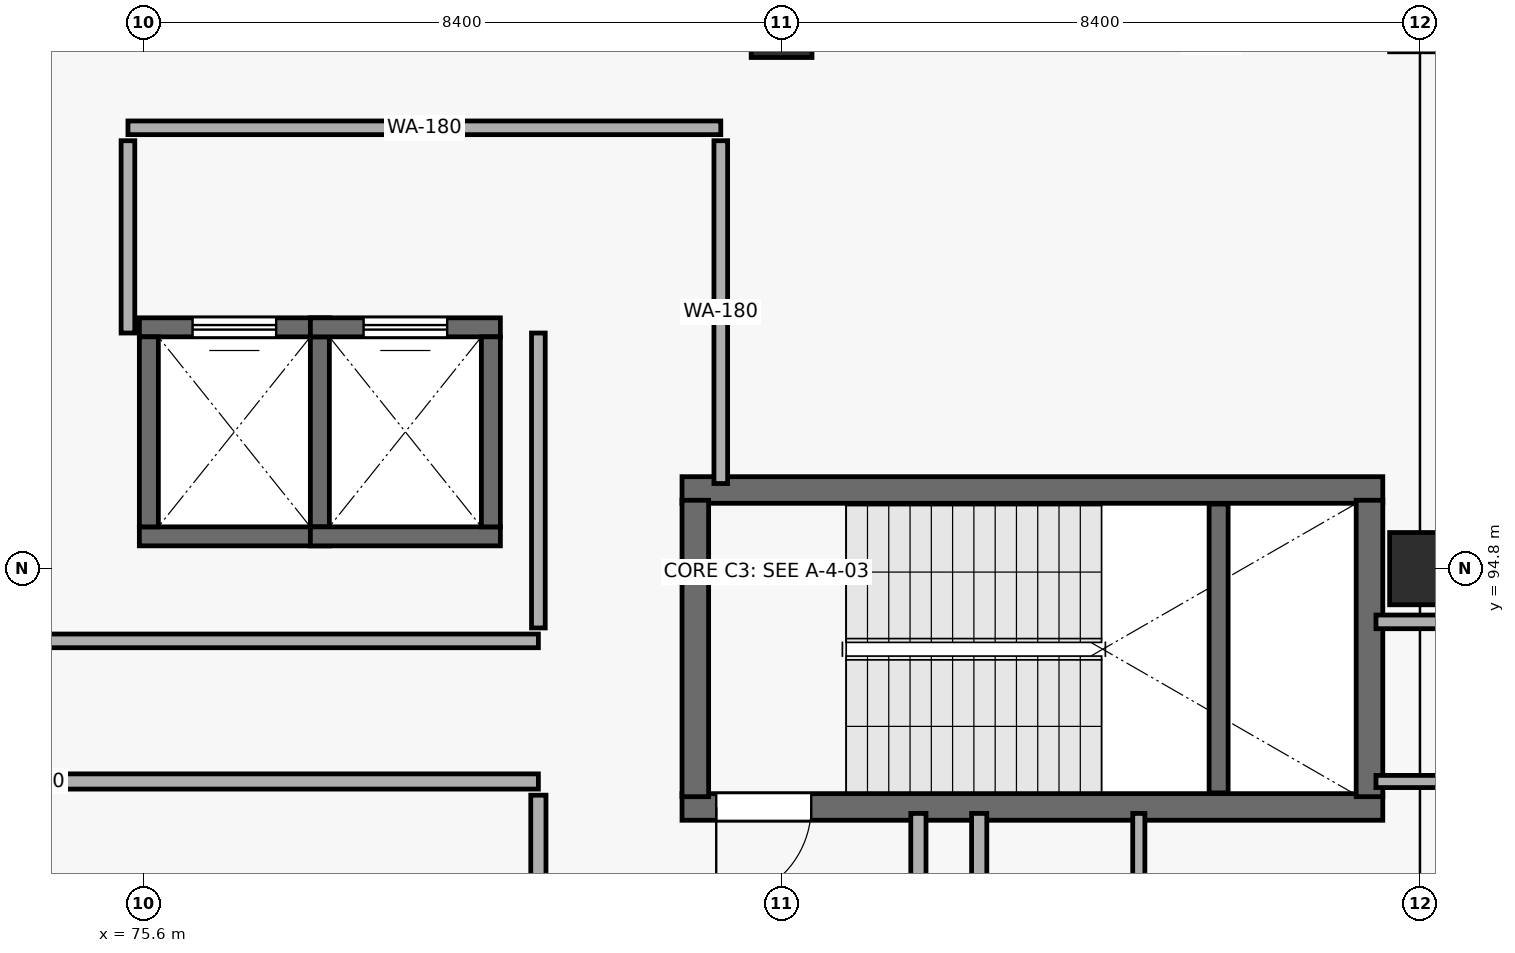
"""IFC4 building model, lengths in metres.
Left out: names, types, materials, properties, quantities, classifications, styles, units other than length and angle.
Written with IfcOpenShell. Run it as: python <this file> out.ifc"""

import sys

from ifc_helpers import new_model, si_unit, direction, frame, frame_2d, origin, origin_2d, place, context, subcontext, project, spatial, rectangle, extrude, element, fill, save


model = new_model("IFC4")
c1 = context("Model", 3, precision=1e-05, world=origin(), true_north=direction((0.0, 1.0)))
c2 = subcontext(c1, "Body", "Model", "MODEL_VIEW")
j1 = project(units=[si_unit("LENGTHUNIT", "METRE"), si_unit("PLANEANGLEUNIT", "RADIAN")], contexts=[c1])
p1 = place(None, origin())
s1 = spatial("IfcSite", under=j1, at=p1, CompositionType="ELEMENT")
p2 = place(p1, origin())
s2 = spatial("IfcBuilding", under=s1, at=p2, CompositionType="ELEMENT")
p3 = place(p2, frame((0.0, 0.0, 5.4)))
s3 = spatial("IfcBuildingStorey", under=s2, at=p3, CompositionType="ELEMENT", Elevation=5.4)
for number, where, z_axis, x_axis in (
    (1, (84.0, 102.0, 0.0), (0.0, 0.0, 1.0), (1.0, 0.0, 0.0)),
    (2, (92.4, 94.8, 0.0), (0.0, 0.0, 1.0), (1.0, 0.0, 0.0)),
):
    element("IfcColumn", number, at=place(p3, frame(where, z_axis=z_axis, x_axis=x_axis)), inside=s3, PredefinedType="COLUMN", context=c2, shape_type="SweptSolid", body=[
        extrude(rectangle(XDim=0.8, YDim=0.95, at=origin_2d()), origin(), (0.0, 0.0, 1.0), 4.8),
    ])
p4 = place(p3, frame((92.4, 102.0, 0.0), z_axis=(0.0, 0.0, 1.0), x_axis=(1.0, 0.0, 0.0)))
e3 = element("IfcColumn", 3, at=p4, inside=s3, PredefinedType="COLUMN", context=c2, shape_type="SweptSolid", body=[
    extrude(rectangle(XDim=0.8, YDim=0.8, at=origin_2d()), origin(), (0.0, 0.0, 1.0), 4.8),
])
p5 = place(p3, frame((82.69, 91.665, 0.0), z_axis=(0.0, 0.0, 1.0), x_axis=(1.0, 0.0, 0.0)))
e4 = element("IfcWall", 4, at=p5, inside=s3, PredefinedType="SHEAR", context=c2, shape_type="SweptSolid", body=[
    extrude(rectangle(XDim=9.22, YDim=0.35, at=frame_2d((4.61, 0.0))), origin(), (0.0, 0.0, 1.0), 4.52),
])
p6 = place(p5, frame((0.45, 0.0, 0.0)))
e5 = element("IfcOpeningElement", 5, at=p6, cuts=e4, PredefinedType="OPENING", context=c2, shape_type="SweptSolid", body=[
    extrude(rectangle(XDim=1.25, YDim=2.2, at=frame_2d((0.625, 1.1))), frame((0.0, 0.185, 0.0), z_axis=(0.0, -1.0, 0.0), x_axis=(1.0, 0.0, 0.0)), (0.0, 0.0, 1.0), 0.37),
])
p7 = place(p3, frame((91.91, 95.835, 0.0), z_axis=(0.0, 0.0, 1.0), x_axis=(-1.0, 0.0, 0.0)))
e6 = element("IfcWall", 6, at=p7, inside=s3, PredefinedType="SHEAR", context=c2, shape_type="SweptSolid", body=[
    extrude(rectangle(XDim=9.22, YDim=0.35, at=frame_2d((4.61, 0.0))), origin(), (0.0, 0.0, 1.0), 4.52),
])
for number, where, z_axis, x_axis in (
    (7, (82.865, 91.8, 0.0), (0.0, 0.0, 1.0), (0.0, 1.0, 0.0)),
    (8, (91.735, 95.7, 0.0), (0.0, 0.0, 1.0), (0.0, -1.0, 0.0)),
):
    element("IfcWall", number, at=place(p3, frame(where, z_axis=z_axis, x_axis=x_axis)), inside=s3, PredefinedType="SHEAR", context=c2, shape_type="SweptSolid", body=[
        extrude(rectangle(XDim=3.9, YDim=0.35, at=frame_2d((1.95, 0.0))), origin(), (0.0, 0.0, 1.0), 4.52),
    ])
p8 = place(p3, frame((89.75, 91.85, 0.0), z_axis=(0.0, 0.0, 1.0), x_axis=(0.0, 1.0, 0.0)))
e9 = element("IfcWall", 9, at=p8, inside=s3, PredefinedType="SHEAR", context=c2, shape_type="SweptSolid", body=[
    extrude(rectangle(XDim=3.8, YDim=0.25, at=frame_2d((1.9, 0.0))), origin(), (0.0, 0.0, 1.0), 2.22),
])
p9 = place(p3, frame((75.55, 95.225, 0.0), z_axis=(0.0, 0.0, 1.0), x_axis=(1.0, 0.0, 0.0)))
e10 = element("IfcWall", 10, at=p9, inside=s3, PredefinedType="SHEAR", context=c2, shape_type="SweptSolid", body=[
    extrude(rectangle(XDim=2.5, YDim=0.25, at=frame_2d((1.25, 0.0))), origin(), (0.0, 0.0, 1.0), 4.52),
])
p10 = place(p3, frame((78.05, 97.975, 0.0), z_axis=(0.0, 0.0, 1.0), x_axis=(-1.0, 0.0, 0.0)))
e11 = element("IfcWall", 11, at=p10, inside=s3, PredefinedType="SHEAR", context=c2, shape_type="SweptSolid", body=[
    extrude(rectangle(XDim=2.5, YDim=0.25, at=frame_2d((1.25, 0.0))), origin(), (0.0, 0.0, 1.0), 4.52),
])
p11 = place(p10, frame((0.7, 0.0, 0.0)))
e12 = element("IfcOpeningElement", 12, at=p11, cuts=e11, PredefinedType="OPENING", context=c2, shape_type="SweptSolid", body=[
    extrude(rectangle(XDim=1.1, YDim=2.2, at=frame_2d((0.55, 1.1))), frame((0.0, 0.135, 0.0), z_axis=(0.0, -1.0, 0.0), x_axis=(1.0, 0.0, 0.0)), (0.0, 0.0, 1.0), 0.27),
])
for number, where, z_axis, x_axis in (
    (13, (75.675, 95.35, 0.0), (0.0, 0.0, 1.0), (0.0, 1.0, 0.0)),
    (14, (77.925, 97.85, 0.0), (0.0, 0.0, 1.0), (0.0, -1.0, 0.0)),
    (15, (77.8, 95.225, 0.0), (0.0, 0.0, 1.0), (1.0, 0.0, 0.0)),
):
    element("IfcWall", number, at=place(p3, frame(where, z_axis=z_axis, x_axis=x_axis)), inside=s3, PredefinedType="SHEAR", context=c2, shape_type="SweptSolid", body=[
        extrude(rectangle(XDim=2.5, YDim=0.25, at=frame_2d((1.25, 0.0))), origin(), (0.0, 0.0, 1.0), 4.52),
    ])
p12 = place(p3, frame((80.3, 97.975, 0.0), z_axis=(0.0, 0.0, 1.0), x_axis=(-1.0, 0.0, 0.0)))
e16 = element("IfcWall", 16, at=p12, inside=s3, PredefinedType="SHEAR", context=c2, shape_type="SweptSolid", body=[
    extrude(rectangle(XDim=2.5, YDim=0.25, at=frame_2d((1.25, 0.0))), origin(), (0.0, 0.0, 1.0), 4.52),
])
p13 = place(p12, frame((0.7, 0.0, 0.0)))
e17 = element("IfcOpeningElement", 17, at=p13, cuts=e16, PredefinedType="OPENING", context=c2, shape_type="SweptSolid", body=[
    extrude(rectangle(XDim=1.1, YDim=2.2, at=frame_2d((0.55, 1.1))), frame((0.0, 0.135, 0.0), z_axis=(0.0, -1.0, 0.0), x_axis=(1.0, 0.0, 0.0)), (0.0, 0.0, 1.0), 0.27),
])
p14 = place(p3, frame((80.175, 97.85, 0.0), z_axis=(0.0, 0.0, 1.0), x_axis=(0.0, -1.0, 0.0)))
e18 = element("IfcWall", 18, at=p14, inside=s3, PredefinedType="SHEAR", context=c2, shape_type="SweptSolid", body=[
    extrude(rectangle(XDim=2.5, YDim=0.25, at=frame_2d((1.25, 0.0))), origin(), (0.0, 0.0, 1.0), 4.52),
])
p15 = place(p3, frame((86.6, 91.58, 0.0), z_axis=(0.0, 0.0, 1.0), x_axis=(0.0, -1.0, 0.0)))
e19 = element("IfcWall", 19, at=p15, inside=s3, PredefinedType="PARTITIONING", context=c2, shape_type="SweptSolid", body=[
    extrude(rectangle(XDim=19.43, YDim=0.2, at=frame_2d((9.715, 0.0))), origin(), (0.0, 0.0, 1.0), 4.52),
])
p16 = place(p15, frame((9.225, 0.0, 0.0)))
e20 = element("IfcOpeningElement", 20, at=p16, cuts=e19, PredefinedType="OPENING", context=c2, shape_type="SweptSolid", body=[
    extrude(rectangle(XDim=0.98, YDim=2.12, at=frame_2d((0.49, 1.06))), frame((0.0, 0.11, 0.0), z_axis=(0.0, -1.0, 0.0), x_axis=(1.0, 0.0, 0.0)), (0.0, 0.0, 1.0), 0.22),
])
p17 = place(p3, frame((88.7, 72.15, 0.0), z_axis=(0.0, 0.0, 1.0), x_axis=(0.0, 1.0, 0.0)))
e21 = element("IfcWall", 21, at=p17, inside=s3, PredefinedType="PARTITIONING", context=c2, shape_type="SweptSolid", body=[
    extrude(rectangle(XDim=19.43, YDim=0.16, at=frame_2d((9.715, 0.0))), origin(), (0.0, 0.0, 1.0), 4.52),
])
p18 = place(p17, frame((7.729, 0.0, 0.0)))
e22 = element("IfcOpeningElement", 22, at=p18, cuts=e21, PredefinedType="OPENING", context=c2, shape_type="SweptSolid", body=[
    extrude(rectangle(XDim=1.64, YDim=2.42, at=frame_2d((0.82, 1.21))), frame((0.0, 0.09, 0.0), z_axis=(0.0, -1.0, 0.0), x_axis=(1.0, 0.0, 0.0)), (0.0, 0.0, 1.0), 0.18),
])
p19 = place(p3, frame((80.8, 93.85, 0.0), z_axis=(0.0, 0.0, 1.0), x_axis=(-1.0, 0.0, 0.0)))
e23 = element("IfcWall", 23, at=p19, inside=s3, PredefinedType="PARTITIONING", context=c2, shape_type="SweptSolid", body=[
    extrude(rectangle(XDim=14.13, YDim=0.18, at=frame_2d((7.065, 0.0))), origin(), (0.0, 0.0, 1.0), 4.52),
])
p20 = place(p3, frame((67.36, 92.0, 0.0), z_axis=(0.0, 0.0, 1.0), x_axis=(1.0, 0.0, 0.0)))
e24 = element("IfcWall", 24, at=p20, inside=s3, PredefinedType="PARTITIONING", context=c2, shape_type="SweptSolid", body=[
    extrude(rectangle(XDim=13.44, YDim=0.2, at=frame_2d((6.72, 0.0))), origin(), (0.0, 0.0, 1.0), 4.52),
])
p21 = place(p3, frame((83.2, 100.6, 0.0), z_axis=(0.0, 0.0, 1.0), x_axis=(-1.0, 0.0, 0.0)))
e25 = element("IfcWall", 25, at=p21, inside=s3, PredefinedType="PARTITIONING", context=c2, shape_type="SweptSolid", body=[
    extrude(rectangle(XDim=7.8, YDim=0.18, at=frame_2d((3.9, 0.0))), origin(), (0.0, 0.0, 1.0), 4.52),
])
p22 = place(p3, frame((96.76, 94.1, 0.0), z_axis=(0.0, 0.0, 1.0), x_axis=(-1.0, 0.0, 0.0)))
e26 = element("IfcWall", 26, at=p22, inside=s3, PredefinedType="PARTITIONING", context=c2, shape_type="SweptSolid", body=[
    extrude(rectangle(XDim=4.94, YDim=0.18, at=frame_2d((2.47, 0.0))), origin(), (0.0, 0.0, 1.0), 4.52),
])
p23 = place(p3, frame((91.82, 92.0, 0.0), z_axis=(0.0, 0.0, 1.0), x_axis=(1.0, 0.0, 0.0)))
e27 = element("IfcWall", 27, at=p23, inside=s3, PredefinedType="PARTITIONING", context=c2, shape_type="SweptSolid", body=[
    extrude(rectangle(XDim=4.95, YDim=0.16, at=frame_2d((2.475, 0.0))), origin(), (0.0, 0.0, 1.0), 4.52),
])
p24 = place(p3, frame((83.2, 95.92, 0.0), z_axis=(0.0, 0.0, 1.0), x_axis=(0.0, 1.0, 0.0)))
e28 = element("IfcWall", 28, at=p24, inside=s3, PredefinedType="PARTITIONING", context=c2, shape_type="SweptSolid", body=[
    extrude(rectangle(XDim=4.51, YDim=0.18, at=frame_2d((2.255, 0.0))), origin(), (0.0, 0.0, 1.0), 4.52),
])
p25 = place(p3, frame((80.8, 97.9, 0.0), z_axis=(0.0, 0.0, 1.0), x_axis=(0.0, -1.0, 0.0)))
e29 = element("IfcWall", 29, at=p25, inside=s3, PredefinedType="PARTITIONING", context=c2, shape_type="SweptSolid", body=[
    extrude(rectangle(XDim=3.88, YDim=0.18, at=frame_2d((1.94, 0.0))), origin(), (0.0, 0.0, 1.0), 4.52),
])
p26 = place(p3, frame((80.8, 91.82, 0.0), z_axis=(0.0, 0.0, 1.0), x_axis=(0.0, -1.0, 0.0)))
e30 = element("IfcWall", 30, at=p26, inside=s3, PredefinedType="PARTITIONING", context=c2, shape_type="SweptSolid", body=[
    extrude(rectangle(XDim=2.44, YDim=0.2, at=frame_2d((1.22, 0.0))), origin(), (0.0, 0.0, 1.0), 4.52),
])
p27 = place(p3, frame((75.4, 100.43, 0.0), z_axis=(0.0, 0.0, 1.0), x_axis=(0.0, -1.0, 0.0)))
e31 = element("IfcWall", 31, at=p27, inside=s3, PredefinedType="PARTITIONING", context=c2, shape_type="SweptSolid", body=[
    extrude(rectangle(XDim=2.53, YDim=0.18, at=frame_2d((1.265, 0.0))), origin(), (0.0, 0.0, 1.0), 3.15),
])
p28 = place(p3, frame((85.8, 89.38, 0.0), z_axis=(0.0, 0.0, 1.0), x_axis=(0.0, 1.0, 0.0)))
e32 = element("IfcWall", 32, at=p28, inside=s3, PredefinedType="PARTITIONING", context=c2, shape_type="SweptSolid", body=[
    extrude(rectangle(XDim=2.2, YDim=0.2, at=frame_2d((1.1, 0.0))), origin(), (0.0, 0.0, 1.0), 4.52),
])
p29 = place(p6, origin())
e33 = element("IfcDoor", 33, at=p29, inside=s3, OperationType="SINGLE_SWING_RIGHT", PredefinedType="DOOR", context=c2, shape_type="SweptSolid", body=[
    extrude(rectangle(XDim=1.25, YDim=2.2, at=frame_2d((0.625, 1.1))), frame((0.0, 0.025, 0.0), z_axis=(0.0, -1.0, 0.0), x_axis=(1.0, 0.0, 0.0)), (0.0, 0.0, 1.0), 0.05),
])
fill(e5, e33)
p30 = place(p11, origin())
e34 = element("IfcDoor", 34, at=p30, inside=s3, OperationType="SLIDING_TO_LEFT", PredefinedType="DOOR", context=c2, shape_type="SweptSolid", body=[
    extrude(rectangle(XDim=1.1, YDim=2.2, at=frame_2d((0.55, 1.1))), frame((0.0, 0.025, 0.0), z_axis=(0.0, -1.0, 0.0), x_axis=(1.0, 0.0, 0.0)), (0.0, 0.0, 1.0), 0.05),
])
fill(e12, e34)
p31 = place(p13, origin())
e35 = element("IfcDoor", 35, at=p31, inside=s3, OperationType="SLIDING_TO_LEFT", PredefinedType="DOOR", context=c2, shape_type="SweptSolid", body=[
    extrude(rectangle(XDim=1.1, YDim=2.2, at=frame_2d((0.55, 1.1))), frame((0.0, 0.025, 0.0), z_axis=(0.0, -1.0, 0.0), x_axis=(1.0, 0.0, 0.0)), (0.0, 0.0, 1.0), 0.05),
])
fill(e17, e35)
save(model, sys.argv[1])
